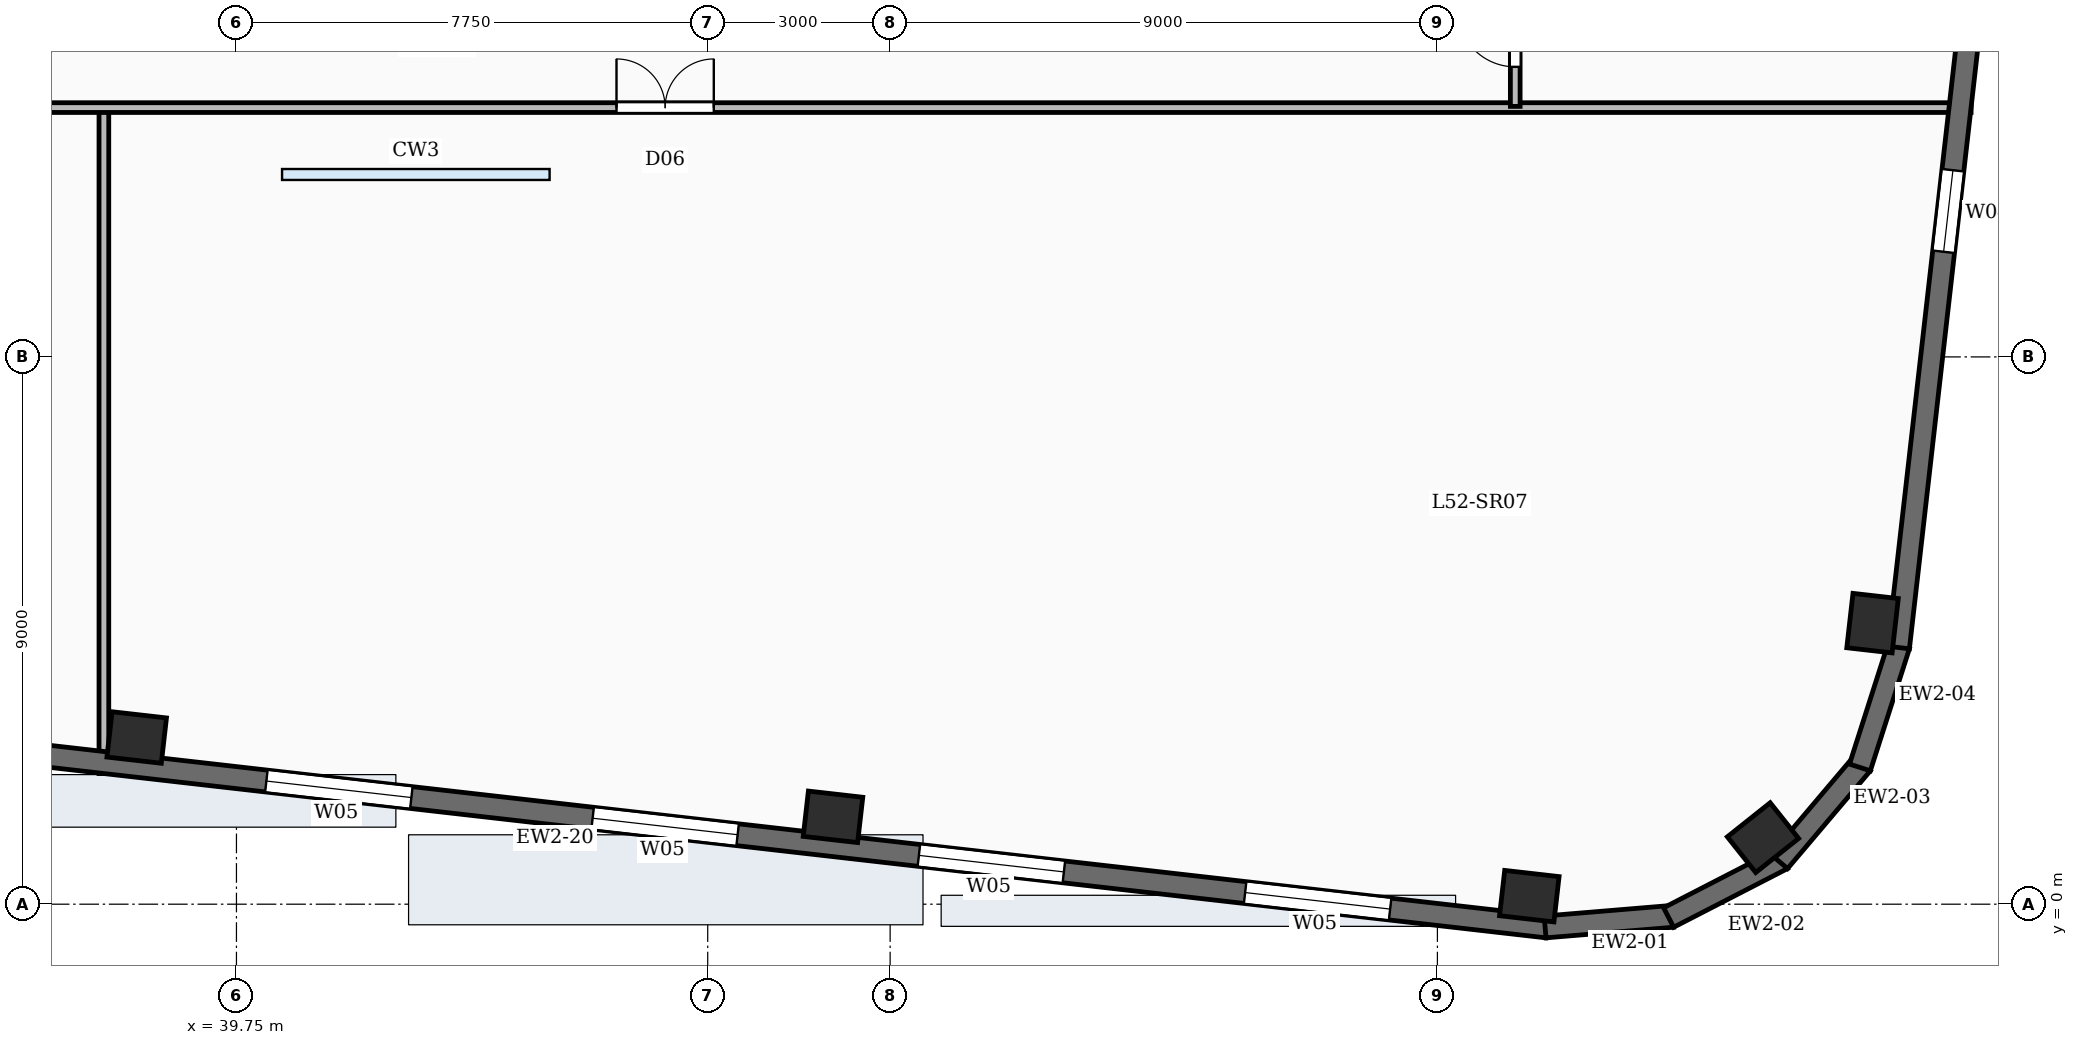
"""IFC4 building model, lengths in metres.
Left out: names, types, materials, properties, quantities, classifications, styles, units other than length and angle.
Written with IfcOpenShell. Run it as: python <this file> out.ifc"""

import sys

from ifc_helpers import new_model, si_unit, direction, frame, frame_2d, origin, origin_2d, place, context, subcontext, project, spatial, rectangle, extrude, element, fill, save


model = new_model("IFC4")
c1 = context("Model", 3, precision=1e-05, world=origin(), true_north=direction((0.0, 1.0)))
c2 = subcontext(c1, "Body", "Model", "MODEL_VIEW")
j1 = project(units=[si_unit("LENGTHUNIT", "METRE"), si_unit("PLANEANGLEUNIT", "RADIAN")], contexts=[c1])
p1 = place(None, origin())
s1 = spatial("IfcSite", under=j1, at=p1, CompositionType="ELEMENT")
p2 = place(p1, origin())
s2 = spatial("IfcBuilding", under=s1, at=p2, CompositionType="ELEMENT")
p3 = place(p2, frame((0.0, 0.0, 216.15)))
s3 = spatial("IfcBuildingStorey", under=s2, at=p3, CompositionType="ELEMENT", Elevation=216.15)
for number, where, z_axis, x_axis in (
    (1, (38.11, 2.741, -0.45), (0.0, 0.0, 1.0), (0.994, -0.113, 0.0)),
    (2, (49.56, 1.437, -0.45), (0.0, 0.0, 1.0), (0.994, -0.113, 0.0)),
    (3, (61.011, 0.132, -0.45), (0.0, 0.0, 1.0), (0.994, -0.113, 0.0)),
    (4, (64.854, 1.094, -0.45), (0.0, 0.0, 1.0), (0.783, 0.623, 0.0)),
    (5, (66.656, 4.622, -0.45), (0.0, 0.0, 1.0), (0.113, 0.994, 0.0)),
):
    element("IfcColumn", number, at=place(p3, frame(where, z_axis=z_axis, x_axis=x_axis)), inside=s3, PredefinedType="COLUMN", context=c2, shape_type="SweptSolid", body=[
        extrude(rectangle(XDim=0.9, YDim=0.75, at=origin_2d()), origin(), (0.0, 0.0, 1.0), 4.98),
    ])
p4 = place(p3, frame((63.37, -0.199, 0.0), z_axis=(0.0, 0.0, 1.0), x_axis=(-0.996562518477, -0.082844111233, 0.0)))
e6 = element("IfcWall", 6, at=p4, inside=s3, PredefinedType="SOLIDWALL", context=c2, shape_type="SweptSolid", body=[
    extrude(rectangle(XDim=2.107, YDim=0.36, at=frame_2d((1.054, 0.0))), origin(), (0.0, 0.0, 1.0), 4.53),
])
for number, where, z_axis, x_axis in (
    (7, (65.176, 0.746, 0.0), (0.0, 0.0, 1.0), (-0.889, -0.458, 0.0)),
    (8, (66.482, 2.31, 0.0), (0.0, 0.0, 1.0), (-0.646, -0.763, 0.0)),
):
    element("IfcWall", number, at=place(p3, frame(where, z_axis=z_axis, x_axis=x_axis)), inside=s3, PredefinedType="SOLIDWALL", context=c2, shape_type="SweptSolid", body=[
        extrude(rectangle(XDim=2.107, YDim=0.36, at=frame_2d((1.053, 0.0))), origin(), (0.0, 0.0, 1.0), 4.53),
    ])
p5 = place(p3, frame((67.091, 4.256, 0.0), z_axis=(0.0, 0.0, 1.0), x_axis=(-0.304838787518, -0.952403965565, 0.0)))
e9 = element("IfcWall", 9, at=p5, inside=s3, PredefinedType="SOLIDWALL", context=c2, shape_type="SweptSolid", body=[
    extrude(rectangle(XDim=2.107, YDim=0.36, at=frame_2d((1.054, 0.0))), origin(), (0.0, 0.0, 1.0), 4.53),
])
p6 = place(p3, frame((70.989, 38.499, 0.0), z_axis=(0.0, 0.0, 1.0), x_axis=(-0.113203107947, -0.993571867733, 0.0)))
e10 = element("IfcWall", 10, at=p6, inside=s3, PredefinedType="SOLIDWALL", context=c2, shape_type="SweptSolid", body=[
    extrude(rectangle(XDim=34.5, YDim=0.36, at=frame_2d((17.25, 0.0))), origin(), (0.0, 0.0, 1.0), 4.53),
])
p7 = place(p6, frame((4.2, 0.0, 0.88)))
e11 = element("IfcOpeningElement", 11, at=p7, cuts=e10, PredefinedType="OPENING", context=c2, shape_type="SweptSolid", body=[
    extrude(rectangle(XDim=1.35, YDim=2.2, at=frame_2d((0.675, 1.1))), frame((0.0, 0.19, 0.0), z_axis=(0.0, -1.0, 0.0), x_axis=(1.0, 0.0, 0.0)), (0.0, 0.0, 1.0), 0.38),
])
p8 = place(p6, frame((15.4, 0.0, 0.88)))
e12 = element("IfcOpeningElement", 12, at=p8, cuts=e10, PredefinedType="OPENING", context=c2, shape_type="SweptSolid", body=[
    extrude(rectangle(XDim=1.35, YDim=2.2, at=frame_2d((0.675, 1.1))), frame((0.0, 0.19, 0.0), z_axis=(0.0, -1.0, 0.0), x_axis=(1.0, 0.0, 0.0)), (0.0, 0.0, 1.0), 0.38),
])
p9 = place(p6, frame((26.6, 0.0, 0.88)))
e13 = element("IfcOpeningElement", 13, at=p9, cuts=e10, PredefinedType="OPENING", context=c2, shape_type="SweptSolid", body=[
    extrude(rectangle(XDim=1.35, YDim=2.2, at=frame_2d((0.675, 1.1))), frame((0.0, 0.19, 0.0), z_axis=(0.0, -1.0, 0.0), x_axis=(1.0, 0.0, 0.0)), (0.0, 0.0, 1.0), 0.38),
])
p10 = place(p3, frame((61.306, -0.375, 0.0), z_axis=(0.0, 0.0, 1.0), x_axis=(-0.993571958919, 0.113202307616, 0.0)))
e14 = element("IfcWall", 14, at=p10, inside=s3, PredefinedType="SOLIDWALL", context=c2, shape_type="SweptSolid", body=[
    extrude(rectangle(XDim=46.8, YDim=0.36, at=frame_2d((23.4, 0.0))), origin(), (0.0, 0.0, 1.0), 4.53),
])
p11 = place(p10, frame((2.6, 0.0, 0.85)))
e15 = element("IfcOpeningElement", 15, at=p11, cuts=e14, PredefinedType="OPENING", context=c2, shape_type="SweptSolid", body=[
    extrude(rectangle(XDim=2.4, YDim=3.0, at=frame_2d((1.2, 1.5))), frame((0.0, 0.19, 0.0), z_axis=(0.0, -1.0, 0.0), x_axis=(1.0, 0.0, 0.0)), (0.0, 0.0, 1.0), 0.38),
])
p12 = place(p10, frame((8.0, 0.0, 0.85)))
e16 = element("IfcOpeningElement", 16, at=p12, cuts=e14, PredefinedType="OPENING", context=c2, shape_type="SweptSolid", body=[
    extrude(rectangle(XDim=2.4, YDim=3.0, at=frame_2d((1.2, 1.5))), frame((0.0, 0.19, 0.0), z_axis=(0.0, -1.0, 0.0), x_axis=(1.0, 0.0, 0.0)), (0.0, 0.0, 1.0), 0.38),
])
p13 = place(p10, frame((13.4, 0.0, 0.85)))
e17 = element("IfcOpeningElement", 17, at=p13, cuts=e14, PredefinedType="OPENING", context=c2, shape_type="SweptSolid", body=[
    extrude(rectangle(XDim=2.4, YDim=3.0, at=frame_2d((1.2, 1.5))), frame((0.0, 0.19, 0.0), z_axis=(0.0, -1.0, 0.0), x_axis=(1.0, 0.0, 0.0)), (0.0, 0.0, 1.0), 0.38),
])
p14 = place(p10, frame((18.8, 0.0, 0.85)))
e18 = element("IfcOpeningElement", 18, at=p14, cuts=e14, PredefinedType="OPENING", context=c2, shape_type="SweptSolid", body=[
    extrude(rectangle(XDim=2.4, YDim=3.0, at=frame_2d((1.2, 1.5))), frame((0.0, 0.19, 0.0), z_axis=(0.0, -1.0, 0.0), x_axis=(1.0, 0.0, 0.0)), (0.0, 0.0, 1.0), 0.38),
])
p15 = place(p10, frame((29.6, 0.0, 0.85)))
e19 = element("IfcOpeningElement", 19, at=p15, cuts=e14, PredefinedType="OPENING", context=c2, shape_type="SweptSolid", body=[
    extrude(rectangle(XDim=2.4, YDim=3.0, at=frame_2d((1.2, 1.5))), frame((0.0, 0.19, 0.0), z_axis=(0.0, -1.0, 0.0), x_axis=(1.0, 0.0, 0.0)), (0.0, 0.0, 1.0), 0.38),
])
p16 = place(p10, frame((40.4, 0.0, 0.85)))
e20 = element("IfcOpeningElement", 20, at=p16, cuts=e14, PredefinedType="OPENING", context=c2, shape_type="SweptSolid", body=[
    extrude(rectangle(XDim=2.4, YDim=3.0, at=frame_2d((1.2, 1.5))), frame((0.0, 0.19, 0.0), z_axis=(0.0, -1.0, 0.0), x_axis=(1.0, 0.0, 0.0)), (0.0, 0.0, 1.0), 0.38),
])
p17 = place(p3, frame((10.303, 13.1, 0.0), z_axis=(0.0, 0.0, 1.0), x_axis=(1.0, 0.0, 0.0)))
e21 = element("IfcWall", 21, at=p17, inside=s3, PredefinedType="PARTITIONING", context=c2, shape_type="SweptSolid", body=[
    extrude(rectangle(XDim=57.973, YDim=0.16, at=frame_2d((28.986, 0.0))), origin(), (0.0, 0.0, 1.0), 3.59),
])
p18 = place(p17, frame((14.697, 0.0, 0.0)))
e22 = element("IfcOpeningElement", 22, at=p18, cuts=e21, PredefinedType="OPENING", context=c2, shape_type="SweptSolid", body=[
    extrude(rectangle(XDim=1.6, YDim=2.15, at=frame_2d((0.8, 1.075))), frame((0.0, 0.09, 0.0), z_axis=(0.0, -1.0, 0.0), x_axis=(1.0, 0.0, 0.0)), (0.0, 0.0, 1.0), 0.18),
])
p19 = place(p17, frame((35.697, 0.0, 0.0)))
e23 = element("IfcOpeningElement", 23, at=p19, cuts=e21, PredefinedType="OPENING", context=c2, shape_type="SweptSolid", body=[
    extrude(rectangle(XDim=1.6, YDim=2.15, at=frame_2d((0.8, 1.075))), frame((0.0, 0.09, 0.0), z_axis=(0.0, -1.0, 0.0), x_axis=(1.0, 0.0, 0.0)), (0.0, 0.0, 1.0), 0.18),
])
p20 = place(p3, frame((37.57, 2.149, 0.0), z_axis=(0.0, 0.0, 1.0), x_axis=(0.0, 1.0, 0.0)))
e24 = element("IfcWall", 24, at=p20, inside=s3, PredefinedType="PARTITIONING", context=c2, shape_type="SweptSolid", body=[
    extrude(rectangle(XDim=10.951, YDim=0.16, at=frame_2d((5.476, 0.0))), origin(), (0.0, 0.0, 1.0), 3.59),
])
p21 = place(p3, frame((60.78, 13.12, 0.0), z_axis=(0.0, 0.0, 1.0), x_axis=(0.0, 1.0, 0.0)))
e25 = element("IfcWall", 25, at=p21, inside=s3, PredefinedType="PARTITIONING", context=c2, shape_type="SweptSolid", body=[
    extrude(rectangle(XDim=2.3, YDim=0.16, at=frame_2d((1.15, 0.0))), origin(), (0.0, 0.0, 1.0), 3.59),
])
p22 = place(p21, frame((0.65, 0.0, 0.0)))
e26 = element("IfcOpeningElement", 26, at=p22, cuts=e25, PredefinedType="OPENING", context=c2, shape_type="SweptSolid", body=[
    extrude(rectangle(XDim=0.95, YDim=2.15, at=frame_2d((0.475, 1.075))), frame((0.0, 0.09, 0.0), z_axis=(0.0, -1.0, 0.0), x_axis=(1.0, 0.0, 0.0)), (0.0, 0.0, 1.0), 0.18),
])
p23 = place(p9, origin())
e27 = element("IfcWindow", 27, at=p23, inside=s3, PartitioningType="SINGLE_PANEL", PredefinedType="WINDOW", context=c2, shape_type="SweptSolid", body=[
    extrude(rectangle(XDim=1.35, YDim=2.2, at=frame_2d((0.675, 1.1))), frame((0.0, 0.03, 0.0), z_axis=(0.0, -1.0, 0.0), x_axis=(1.0, 0.0, 0.0)), (0.0, 0.0, 1.0), 0.06),
])
fill(e13, e27)
p24 = place(p11, origin())
e28 = element("IfcWindow", 28, at=p24, inside=s3, PartitioningType="DOUBLE_PANEL_VERTICAL", PredefinedType="WINDOW", context=c2, shape_type="SweptSolid", body=[
    extrude(rectangle(XDim=2.4, YDim=3.0, at=frame_2d((1.2, 1.5))), frame((0.0, 0.03, 0.0), z_axis=(0.0, -1.0, 0.0), x_axis=(1.0, 0.0, 0.0)), (0.0, 0.0, 1.0), 0.06),
])
fill(e15, e28)
p25 = place(p12, origin())
e29 = element("IfcWindow", 29, at=p25, inside=s3, PartitioningType="DOUBLE_PANEL_VERTICAL", PredefinedType="WINDOW", context=c2, shape_type="SweptSolid", body=[
    extrude(rectangle(XDim=2.4, YDim=3.0, at=frame_2d((1.2, 1.5))), frame((0.0, 0.03, 0.0), z_axis=(0.0, -1.0, 0.0), x_axis=(1.0, 0.0, 0.0)), (0.0, 0.0, 1.0), 0.06),
])
fill(e16, e29)
p26 = place(p13, origin())
e30 = element("IfcWindow", 30, at=p26, inside=s3, PartitioningType="DOUBLE_PANEL_VERTICAL", PredefinedType="WINDOW", context=c2, shape_type="SweptSolid", body=[
    extrude(rectangle(XDim=2.4, YDim=3.0, at=frame_2d((1.2, 1.5))), frame((0.0, 0.03, 0.0), z_axis=(0.0, -1.0, 0.0), x_axis=(1.0, 0.0, 0.0)), (0.0, 0.0, 1.0), 0.06),
])
fill(e17, e30)
p27 = place(p14, origin())
e31 = element("IfcWindow", 31, at=p27, inside=s3, PartitioningType="DOUBLE_PANEL_VERTICAL", PredefinedType="WINDOW", context=c2, shape_type="SweptSolid", body=[
    extrude(rectangle(XDim=2.4, YDim=3.0, at=frame_2d((1.2, 1.5))), frame((0.0, 0.03, 0.0), z_axis=(0.0, -1.0, 0.0), x_axis=(1.0, 0.0, 0.0)), (0.0, 0.0, 1.0), 0.06),
])
fill(e18, e31)
p28 = place(p19, origin())
e32 = element("IfcDoor", 32, at=p28, inside=s3, OperationType="DOUBLE_DOOR_SINGLE_SWING", PredefinedType="DOOR", context=c2, shape_type="SweptSolid", body=[
    extrude(rectangle(XDim=1.6, YDim=2.15, at=frame_2d((0.8, 1.075))), frame((0.0, 0.025, 0.0), z_axis=(0.0, -1.0, 0.0), x_axis=(1.0, 0.0, 0.0)), (0.0, 0.0, 1.0), 0.05),
])
fill(e23, e32)
p29 = place(p22, origin())
e33 = element("IfcDoor", 33, at=p29, inside=s3, OperationType="SINGLE_SWING_RIGHT", PredefinedType="DOOR", context=c2, shape_type="SweptSolid", body=[
    extrude(rectangle(XDim=0.95, YDim=2.15, at=frame_2d((0.475, 1.075))), frame((0.0, 0.025, 0.0), z_axis=(0.0, -1.0, 0.0), x_axis=(1.0, 0.0, 0.0)), (0.0, 0.0, 1.0), 0.05),
])
fill(e26, e33)
save(model, sys.argv[1])
